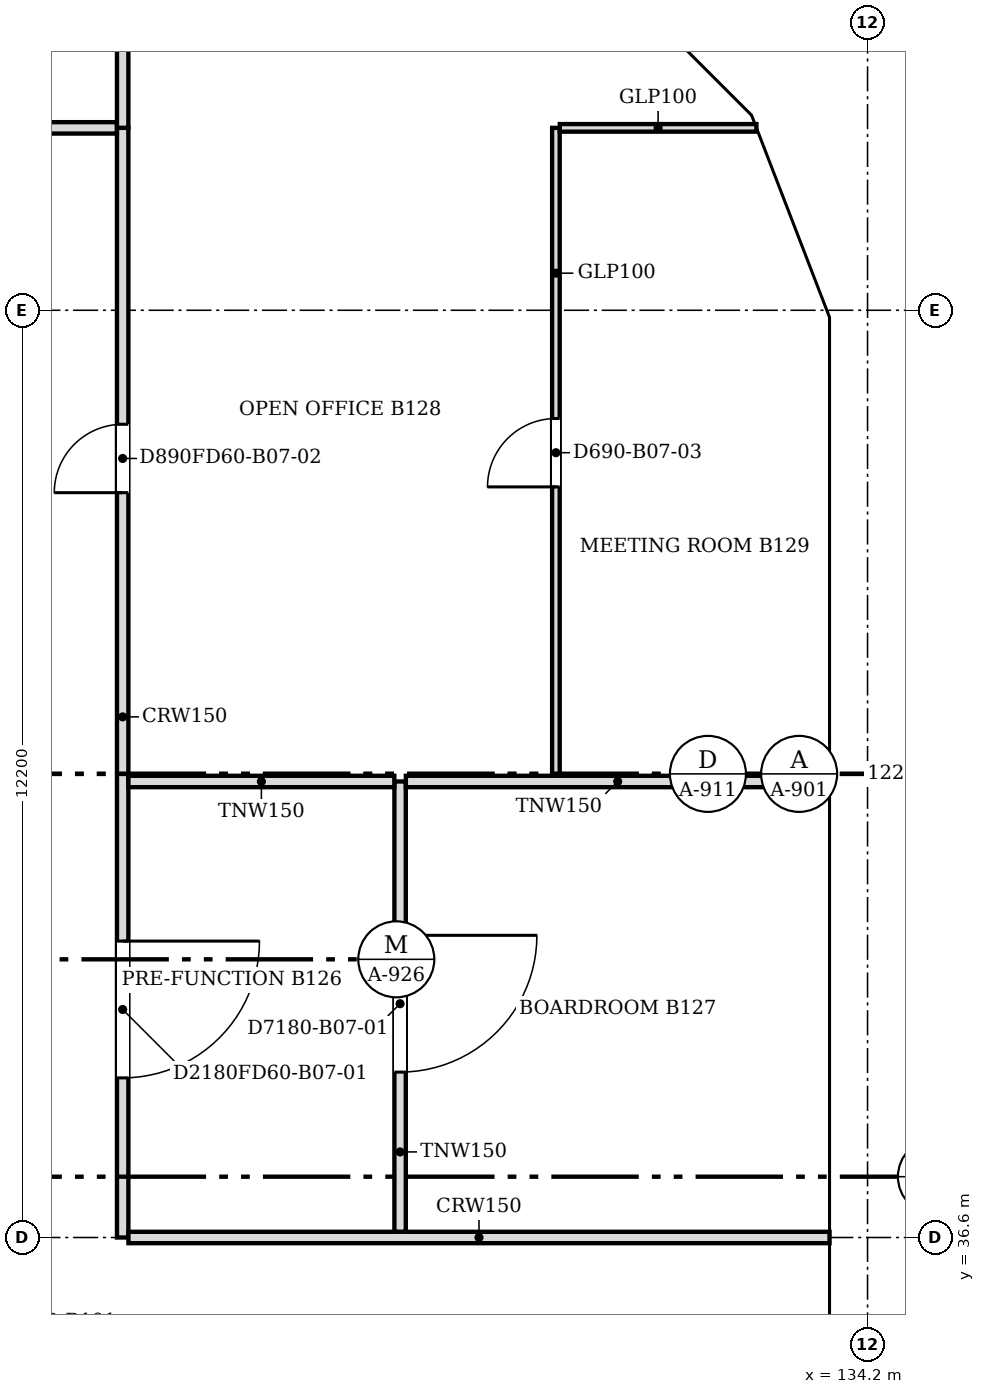
"""IFC4 building model, lengths in metres.
Left out: names, types, materials, properties, quantities, classifications, styles, units other than length and angle.
Written with IfcOpenShell. Run it as: python <this file> out.ifc"""

import sys

from ifc_helpers import new_model, si_unit, direction, frame, frame_2d, origin, place, context, subcontext, project, spatial, polyline, rectangle, outline, extrude, faceted_brep, source, transform, mapped, element, fill, save


model = new_model("IFC4")
c1 = context("Model", 3, precision=1e-05, world=origin(), true_north=direction((0.0, 1.0)))
c2 = subcontext(c1, "Body", "Model", "MODEL_VIEW")
j1 = project(units=[si_unit("LENGTHUNIT", "METRE"), si_unit("PLANEANGLEUNIT", "RADIAN")], contexts=[c1])
p1 = place(None, origin())
s1 = spatial("IfcSite", under=j1, at=p1, CompositionType="ELEMENT")
p2 = place(p1, origin())
s2 = spatial("IfcBuilding", under=s1, at=p2, CompositionType="ELEMENT")
p3 = place(p2, frame((0.0, 0.0, 72.4)))
s3 = spatial("IfcBuildingStorey", under=s2, at=p3, CompositionType="ELEMENT", Elevation=72.4)
m1 = source(origin(), c2, "Body", "Brep", [
    faceted_brep([(3.05, -0.25, 0.0), (6.1, -0.25, 3.8), (6.1, -0.25, 3.8), (3.05, -0.25, 7.6), (0.0, -0.25, 3.8), (0.0, 0.25, 3.8), (3.05, 0.25, 7.6), (6.1, 0.25, 3.8), (6.1, 0.25, 3.8), (3.05, 0.25, 0.0)], [[[0, 1, 2, 3, 4]], [[5, 6, 7, 8, 9]], [[9, 8, 1, 0]], [[7, 6, 3, 2]], [[6, 5, 4, 3]], [[5, 9, 0, 4]], [[1, 8, 7, 2]]]),
])
p4 = place(p3, frame((133.95, 33.55, -3.8), z_axis=(0.0, 0.0, 1.0), x_axis=(0.0, 1.0, 0.0)))
e1 = element("IfcWall", 1, at=p4, inside=s3, PredefinedType="SOLIDWALL", context=c2, shape_type="MappedRepresentation", body=[
    mapped(m1, transform((0.0, 0.0, 0.0), scale=1.0)),
])
m2 = source(origin(), c2, "Body", "SweptSolid", [
    extrude(outline(polyline([(3.05, 0.399), (5.78, 3.8), (3.05, 7.2), (0.321, 3.8), (3.05, 0.399)])), frame((0.0, 0.26, 0.0), z_axis=(0.0, -1.0, 0.0), x_axis=(1.0, 0.0, 0.0)), (0.0, 0.0, 1.0), 0.52),
])
p5 = place(p4, origin())
e2 = element("IfcOpeningElement", 2, at=p5, cuts=e1, PredefinedType="OPENING", context=c2, shape_type="MappedRepresentation", body=[
    mapped(m2, transform((0.0, 0.0, 0.0), scale=1.0)),
])
m3 = source(origin(), c2, "Body", "SweptSolid", [
    extrude(outline(polyline([(3.05, 0.0), (6.1, 3.8), (3.05, 7.6), (0.0, 3.8), (3.05, 0.0)])), frame((0.0, 0.25, 0.0), z_axis=(0.0, -1.0, 0.0), x_axis=(1.0, 0.0, 0.0)), (0.0, 0.0, 1.0), 0.5),
])
p6 = place(p3, frame((133.95, 39.65, -3.8), z_axis=(0.0, 0.0, 1.0), x_axis=(0.0, 1.0, 0.0)))
e3 = element("IfcWall", 3, at=p6, inside=s3, PredefinedType="SOLIDWALL", context=c2, shape_type="MappedRepresentation", body=[
    mapped(m3, transform((0.0, 0.0, 0.0), scale=1.0)),
])
p7 = place(p6, origin())
e4 = element("IfcOpeningElement", 4, at=p7, cuts=e3, PredefinedType="OPENING", context=c2, shape_type="MappedRepresentation", body=[
    mapped(m2, transform((0.0, 0.0, 0.0), scale=1.0)),
])
m4 = source(origin(), c2, "Body", "Brep", [
    faceted_brep([(3.003, -0.25, 0.0), (3.05, -0.25, 0.06), (3.05, -0.25, 7.54), (3.003, -0.25, 7.6), (0.0, -0.25, 3.8), (0.0, 0.25, 3.8), (2.957, 0.25, 7.541), (2.957, 0.25, 0.059), (3.003, 0.0, 0.0), (3.003, 0.0, 7.6)], [[[0, 1, 2, 3, 4]], [[5, 6, 7]], [[1, 0, 8]], [[9, 3, 2]], [[6, 5, 4, 3, 9]], [[5, 7, 8, 0, 4]], [[1, 8, 7, 6, 9, 2]]]),
])
p8 = place(p3, frame((133.95, 45.75, -3.8), z_axis=(0.0, 0.0, 1.0), x_axis=(0.0, 1.0, 0.0)))
e5 = element("IfcWall", 5, at=p8, inside=s3, PredefinedType="SOLIDWALL", context=c2, shape_type="MappedRepresentation", body=[
    mapped(m4, transform((0.0, 0.0, 0.0), scale=1.0)),
])
m5 = source(origin(), c2, "Body", "SweptSolid", [
    extrude(outline(polyline([(2.803, 6.944), (0.319, 3.8), (2.803, 0.656), (2.803, 6.944)])), frame((0.0, 0.26, 0.0), z_axis=(0.0, -1.0, 0.0), x_axis=(1.0, 0.0, 0.0)), (0.0, 0.0, 1.0), 0.52),
])
p9 = place(p8, origin())
e6 = element("IfcOpeningElement", 6, at=p9, cuts=e5, PredefinedType="OPENING", context=c2, shape_type="MappedRepresentation", body=[
    mapped(m5, transform((0.0, 0.0, 0.0), scale=1.0)),
])
m6 = source(origin(), c2, "Body", "Brep", [
    faceted_brep([(0.047, -0.25, 0.0), (2.997, -0.25, 3.8), (0.047, -0.25, 7.6), (0.0, -0.25, 7.541), (0.0, -0.25, 0.059), (0.093, 0.25, 7.54), (2.944, 0.25, 3.868), (2.944, 0.25, 3.732), (0.093, 0.25, 0.06), (2.997, 0.0, 3.8), (0.047, 0.0, 0.0), (0.047, 0.0, 7.6)], [[[0, 1, 2, 3, 4]], [[5, 6, 7, 8]], [[8, 7, 9, 1, 0, 10]], [[6, 5, 11, 2, 1, 9]], [[3, 2, 11]], [[10, 0, 4]], [[8, 10, 4, 3, 11, 5]], [[9, 7, 6]]]),
])
p10 = place(p3, frame((133.967, 48.71, -3.8), z_axis=(0.0, 0.0, 1.0), x_axis=(-0.359901446078, 0.932990326376, 0.0)))
e7 = element("IfcWall", 7, at=p10, inside=s3, PredefinedType="SOLIDWALL", context=c2, shape_type="MappedRepresentation", body=[
    mapped(m6, transform((0.0, 0.0, 0.0), scale=1.0)),
])
m7 = source(origin(), c2, "Body", "SweptSolid", [
    extrude(outline(polyline([(0.247, 0.665), (2.681, 3.8), (0.247, 6.935), (0.247, 0.665)])), frame((0.0, 0.26, 0.0), z_axis=(0.0, -1.0, 0.0), x_axis=(1.0, 0.0, 0.0)), (0.0, 0.0, 1.0), 0.52),
])
p11 = place(p10, origin())
e8 = element("IfcOpeningElement", 8, at=p11, cuts=e7, PredefinedType="OPENING", context=c2, shape_type="MappedRepresentation", body=[
    mapped(m7, transform((0.0, 0.0, 0.0), scale=1.0)),
])
m8 = source(origin(), c2, "Body", "Brep", [
    faceted_brep([(2.944, -0.25, 0.0), (2.997, -0.25, 0.068), (2.997, -0.25, 7.532), (2.944, -0.25, 7.6), (0.0, -0.25, 3.8), (0.053, 0.25, 3.868), (2.891, 0.25, 7.532), (2.891, 0.25, 0.068), (0.053, 0.25, 3.731), (2.944, 0.0, 0.0), (2.944, 0.0, 7.6), (0.0, 0.0, 3.8)], [[[0, 1, 2, 3, 4]], [[5, 6, 7, 8]], [[1, 0, 9]], [[10, 3, 2]], [[6, 5, 11, 4, 3, 10]], [[8, 7, 9, 0, 4, 11]], [[8, 11, 5]], [[1, 9, 7, 6, 10, 2]]]),
])
p12 = place(p3, frame((132.888, 51.506, -3.8), z_axis=(0.0, 0.0, 1.0), x_axis=(-0.707147509625, 0.707066050402, 0.0)))
e9 = element("IfcWall", 9, at=p12, inside=s3, PredefinedType="SOLIDWALL", context=c2, shape_type="MappedRepresentation", body=[
    mapped(m8, transform((0.0, 0.0, 0.0), scale=1.0)),
])
m9 = source(origin(), c2, "Body", "SweptSolid", [
    extrude(outline(polyline([(2.744, 6.934), (0.316, 3.8), (2.744, 0.666), (2.744, 6.934)])), frame((0.0, 0.26, 0.0), z_axis=(0.0, -1.0, 0.0), x_axis=(1.0, 0.0, 0.0)), (0.0, 0.0, 1.0), 0.52),
])
p13 = place(p12, origin())
e10 = element("IfcOpeningElement", 10, at=p13, cuts=e9, PredefinedType="OPENING", context=c2, shape_type="MappedRepresentation", body=[
    mapped(m9, transform((0.0, 0.0, 0.0), scale=1.0)),
])
p14 = place(p2, frame((0.0, 0.0, 76.2)))
s4 = spatial("IfcBuildingStorey", under=s2, at=p14, CompositionType="ELEMENT", Elevation=76.2)
m10 = source(origin(), c2, "Body", "SweptSolid", [
    extrude(outline(polyline([(3.05, 0.0), (6.1, 3.8), (3.05, 7.6), (0.0, 3.8), (3.05, 0.0)])), frame((0.0, 0.25, 0.0), z_axis=(0.0, -1.0, 0.0), x_axis=(1.0, 0.0, 0.0)), (0.0, 0.0, 1.0), 0.5),
])
p15 = place(p14, frame((133.95, 30.5, -3.8), z_axis=(0.0, 0.0, 1.0), x_axis=(0.0, 1.0, 0.0)))
e11 = element("IfcWall", 11, at=p15, inside=s4, PredefinedType="SOLIDWALL", context=c2, shape_type="MappedRepresentation", body=[
    mapped(m10, transform((0.0, 0.0, 0.0), scale=1.0)),
])
m11 = source(origin(), c2, "Body", "SweptSolid", [
    extrude(outline(polyline([(3.05, 0.399), (5.78, 3.8), (3.05, 7.201), (0.321, 3.8), (3.05, 0.399)])), frame((0.0, 0.26, 0.0), z_axis=(0.0, -1.0, 0.0), x_axis=(1.0, 0.0, 0.0)), (0.0, 0.0, 1.0), 0.52),
])
p16 = place(p15, origin())
e12 = element("IfcOpeningElement", 12, at=p16, cuts=e11, PredefinedType="OPENING", context=c2, shape_type="MappedRepresentation", body=[
    mapped(m11, transform((0.0, 0.0, 0.0), scale=1.0)),
])
m12 = source(origin(), c2, "Body", "Brep", [
    faceted_brep([(3.05, -0.25, 0.0), (6.1, -0.25, 3.8), (6.1, -0.25, 3.8), (3.05, -0.25, 7.6), (0.0, -0.25, 3.8), (0.0, 0.25, 3.8), (3.05, 0.25, 7.6), (6.1, 0.25, 3.8), (6.1, 0.25, 3.8), (3.05, 0.25, 0.0)], [[[0, 1, 2, 3, 4]], [[5, 6, 7, 8, 9]], [[9, 8, 1, 0]], [[7, 6, 3, 2]], [[6, 5, 4, 3]], [[5, 9, 0, 4]], [[1, 8, 7, 2]]]),
])
p17 = place(p14, frame((133.95, 36.6, -3.8), z_axis=(0.0, 0.0, 1.0), x_axis=(0.0, 1.0, 0.0)))
e13 = element("IfcWall", 13, at=p17, inside=s4, PredefinedType="SOLIDWALL", context=c2, shape_type="MappedRepresentation", body=[
    mapped(m12, transform((0.0, 0.0, 0.0), scale=1.0)),
])
p18 = place(p17, origin())
e14 = element("IfcOpeningElement", 14, at=p18, cuts=e13, PredefinedType="OPENING", context=c2, shape_type="MappedRepresentation", body=[
    mapped(m11, transform((0.0, 0.0, 0.0), scale=1.0)),
])
m13 = source(origin(), c2, "Body", "Brep", [
    faceted_brep([(3.05, -0.25, 0.0), (6.053, -0.25, 3.8), (3.05, -0.25, 7.6), (0.0, -0.25, 3.8), (0.0, 0.25, 3.8), (3.05, 0.25, 7.6), (6.007, 0.25, 3.859), (6.007, 0.25, 3.741), (3.05, 0.25, 0.0), (6.053, 0.0, 3.8)], [[[0, 1, 2, 3]], [[4, 5, 6, 7, 8]], [[8, 7, 9, 1, 0]], [[6, 5, 2, 1, 9]], [[5, 4, 3, 2]], [[4, 8, 0, 3]], [[9, 7, 6]]]),
])
p19 = place(p14, frame((133.95, 42.7, -3.8), z_axis=(0.0, 0.0, 1.0), x_axis=(0.0, 1.0, 0.0)))
e15 = element("IfcWall", 15, at=p19, inside=s4, PredefinedType="SOLIDWALL", context=c2, shape_type="MappedRepresentation", body=[
    mapped(m13, transform((0.0, 0.0, 0.0), scale=1.0)),
])
m14 = source(origin(), c2, "Body", "SweptSolid", [
    extrude(outline(polyline([(3.049, 0.401), (5.735, 3.8), (3.049, 7.199), (0.321, 3.8), (3.049, 0.401)])), frame((0.0, 0.26, 0.0), z_axis=(0.0, -1.0, 0.0), x_axis=(1.0, 0.0, 0.0)), (0.0, 0.0, 1.0), 0.52),
])
p20 = place(p19, origin())
e16 = element("IfcOpeningElement", 16, at=p20, cuts=e15, PredefinedType="OPENING", context=c2, shape_type="MappedRepresentation", body=[
    mapped(m14, transform((0.0, 0.0, 0.0), scale=1.0)),
])
m15 = source(origin(), c2, "Body", "Brep", [
    faceted_brep([(2.95, -0.25, 0.0), (3.003, -0.25, 0.068), (3.003, -0.25, 7.532), (2.95, -0.25, 7.6), (0.0, -0.25, 3.8), (0.047, 0.25, 3.86), (2.898, 0.25, 7.532), (2.898, 0.25, 0.068), (0.047, 0.25, 3.74), (2.95, 0.0, 0.0), (2.95, 0.0, 7.6), (0.0, 0.0, 3.8)], [[[0, 1, 2, 3, 4]], [[5, 6, 7, 8]], [[1, 0, 9]], [[10, 3, 2]], [[6, 5, 11, 4, 3, 10]], [[8, 7, 9, 0, 4, 11]], [[8, 11, 5]], [[1, 9, 7, 6, 10, 2]]]),
])
p21 = place(p14, frame((133.95, 48.753, -3.8), z_axis=(0.0, 0.0, 1.0), x_axis=(-0.359855894603, 0.933007896601, 0.0)))
e17 = element("IfcWall", 17, at=p21, inside=s4, PredefinedType="SOLIDWALL", context=c2, shape_type="MappedRepresentation", body=[
    mapped(m15, transform((0.0, 0.0, 0.0), scale=1.0)),
])
m16 = source(origin(), c2, "Body", "SweptSolid", [
    extrude(outline(polyline([(2.75, 6.935), (0.316, 3.8), (2.75, 0.665), (2.75, 6.935)])), frame((0.0, 0.26, 0.0), z_axis=(0.0, -1.0, 0.0), x_axis=(1.0, 0.0, 0.0)), (0.0, 0.0, 1.0), 0.52),
])
p22 = place(p21, origin())
e18 = element("IfcOpeningElement", 18, at=p22, cuts=e17, PredefinedType="OPENING", context=c2, shape_type="MappedRepresentation", body=[
    mapped(m16, transform((0.0, 0.0, 0.0), scale=1.0)),
])
m17 = source(origin(), c2, "Body", "Brep", [
    faceted_brep([(0.053, -0.25, 0.0), (2.997, -0.25, 3.8), (0.053, -0.25, 7.6), (0.0, -0.25, 7.532), (0.0, -0.25, 0.068), (0.106, 0.25, 7.532), (2.944, 0.25, 3.868), (2.944, 0.25, 3.732), (0.106, 0.25, 0.068), (2.997, 0.0, 3.8), (0.053, 0.0, 0.0), (0.053, 0.0, 7.6)], [[[0, 1, 2, 3, 4]], [[5, 6, 7, 8]], [[8, 7, 9, 1, 0, 10]], [[6, 5, 11, 2, 1, 9]], [[3, 2, 11]], [[10, 0, 4]], [[8, 10, 4, 3, 11, 5]], [[9, 7, 6]]]),
])
p23 = place(p14, frame((132.926, 51.469, -3.8), z_axis=(0.0, 0.0, 1.0), x_axis=(-0.707066050402, 0.707147509625, 0.0)))
e19 = element("IfcWall", 19, at=p23, inside=s4, PredefinedType="SOLIDWALL", context=c2, shape_type="MappedRepresentation", body=[
    mapped(m17, transform((0.0, 0.0, 0.0), scale=1.0)),
])
m18 = source(origin(), c2, "Body", "SweptSolid", [
    extrude(outline(polyline([(0.253, 0.667), (2.681, 3.8), (0.253, 6.934), (0.253, 0.667)])), frame((0.0, 0.26, 0.0), z_axis=(0.0, -1.0, 0.0), x_axis=(1.0, 0.0, 0.0)), (0.0, 0.0, 1.0), 0.52),
])
p24 = place(p23, origin())
e20 = element("IfcOpeningElement", 20, at=p24, cuts=e19, PredefinedType="OPENING", context=c2, shape_type="MappedRepresentation", body=[
    mapped(m18, transform((0.0, 0.0, 0.0), scale=1.0)),
])
p25 = place(p3, frame((124.4, 51.2, 0.0), z_axis=(0.0, 0.0, 1.0), x_axis=(0.0, -1.0, 0.0)))
e21 = element("IfcWall", 21, at=p25, inside=s3, PredefinedType="PARTITIONING", context=c2, shape_type="SweptSolid", body=[
    extrude(rectangle(XDim=14.6, YDim=0.15, at=frame_2d((7.3, 0.0))), origin(), (0.0, 0.0, 1.0), 3.067),
])
m19 = source(origin(), c2, "Body", "SweptSolid", [
    extrude(rectangle(XDim=0.9, YDim=2.1, at=frame_2d((0.45, 1.05))), frame((0.0, 0.085, 0.0), z_axis=(0.0, -1.0, 0.0), x_axis=(1.0, 0.0, 0.0)), (0.0, 0.0, 1.0), 0.17),
])
p26 = place(p25, frame((3.9, 0.0, 0.0)))
e22 = element("IfcOpeningElement", 22, at=p26, cuts=e21, PredefinedType="OPENING", context=c2, shape_type="MappedRepresentation", body=[
    mapped(m19, transform((0.0, 0.0, 0.0), scale=1.0)),
])
m20 = source(origin(), c2, "Body", "SweptSolid", [
    extrude(rectangle(XDim=1.8, YDim=2.1, at=frame_2d((0.9, 1.05))), frame((0.0, 0.085, 0.0), z_axis=(0.0, -1.0, 0.0), x_axis=(1.0, 0.0, 0.0)), (0.0, 0.0, 1.0), 0.17),
])
p27 = place(p25, frame((10.7, 0.0, 0.0)))
e23 = element("IfcOpeningElement", 23, at=p27, cuts=e21, PredefinedType="OPENING", context=c2, shape_type="MappedRepresentation", body=[
    mapped(m20, transform((0.0, 0.0, 0.0), scale=1.0)),
])
p28 = place(p3, frame((124.476, 36.6, 0.0), z_axis=(0.0, 0.0, 1.0), x_axis=(1.0, 0.0, 0.0)))
e24 = element("IfcWall", 24, at=p28, inside=s3, PredefinedType="PARTITIONING", context=c2, shape_type="SweptSolid", body=[
    extrude(rectangle(XDim=9.224, YDim=0.15, at=frame_2d((4.612, 0.0))), origin(), (0.0, 0.0, 1.0), 3.067),
])
p29 = place(p3, frame((128.05, 42.6, 0.0), z_axis=(0.0, 0.0, 1.0), x_axis=(0.0, -1.0, 0.0)))
e25 = element("IfcWall", 25, at=p29, inside=s3, PredefinedType="PARTITIONING", context=c2, shape_type="SweptSolid", body=[
    extrude(rectangle(XDim=5.924, YDim=0.15, at=frame_2d((2.962, 0.0))), origin(), (0.0, 0.0, 1.0), 3.067),
])
p30 = place(p29, frame((2.024, 0.0, 0.0)))
e26 = element("IfcOpeningElement", 26, at=p30, cuts=e25, PredefinedType="OPENING", context=c2, shape_type="MappedRepresentation", body=[
    mapped(m20, transform((0.0, 0.0, 0.0), scale=1.0)),
])
p31 = place(p3, frame((124.476, 42.6, 0.0), z_axis=(0.0, 0.0, 1.0), x_axis=(1.0, 0.0, 0.0)))
e27 = element("IfcWall", 27, at=p31, inside=s3, PredefinedType="PARTITIONING", context=c2, shape_type="SweptSolid", body=[
    extrude(rectangle(XDim=3.498, YDim=0.15, at=frame_2d((1.749, 0.0))), origin(), (0.0, 0.0, 1.0), 3.067),
])
p32 = place(p3, frame((128.126, 42.6, 0.0), z_axis=(0.0, 0.0, 1.0), x_axis=(1.0, 0.0, 0.0)))
e28 = element("IfcWall", 28, at=p32, inside=s3, PredefinedType="PARTITIONING", context=c2, shape_type="SweptSolid", body=[
    extrude(rectangle(XDim=5.574, YDim=0.15, at=frame_2d((2.787, 0.0))), origin(), (0.0, 0.0, 1.0), 3.067),
])
p33 = place(p3, frame((130.1, 51.2, 0.0), z_axis=(0.0, 0.0, 1.0), x_axis=(0.0, -1.0, 0.0)))
e29 = element("IfcWall", 29, at=p33, inside=s3, PredefinedType="PARTITIONING", context=c2, shape_type="SweptSolid", body=[
    extrude(rectangle(XDim=8.524, YDim=0.1, at=frame_2d((4.262, 0.0))), origin(), (0.0, 0.0, 1.0), 3.067),
])
m21 = source(origin(), c2, "Body", "SweptSolid", [
    extrude(rectangle(XDim=0.9, YDim=2.1, at=frame_2d((0.45, 1.05))), frame((0.0, 0.06, 0.0), z_axis=(0.0, -1.0, 0.0), x_axis=(1.0, 0.0, 0.0)), (0.0, 0.0, 1.0), 0.12),
])
p34 = place(p33, frame((3.824, 0.0, 0.0)))
e30 = element("IfcOpeningElement", 30, at=p34, cuts=e29, PredefinedType="OPENING", context=c2, shape_type="MappedRepresentation", body=[
    mapped(m21, transform((0.0, 0.0, 0.0), scale=1.0)),
])
p35 = place(p3, frame((108.5, 51.2, 0.0), z_axis=(0.0, 0.0, 1.0), x_axis=(1.0, 0.0, 0.0)))
e31 = element("IfcWall", 31, at=p35, inside=s3, PredefinedType="PARTITIONING", context=c2, shape_type="SweptSolid", body=[
    extrude(rectangle(XDim=15.824, YDim=0.15, at=frame_2d((7.912, 0.0))), origin(), (0.0, 0.0, 1.0), 3.067),
])
m22 = source(origin(), c2, "Body", "SweptSolid", [
    extrude(rectangle(XDim=1.0, YDim=2.1, at=frame_2d((0.5, 1.05))), frame((0.0, 0.085, 0.0), z_axis=(0.0, -1.0, 0.0), x_axis=(1.0, 0.0, 0.0)), (0.0, 0.0, 1.0), 0.17),
])
p36 = place(p35, frame((11.451, 0.0, 0.0)))
e32 = element("IfcOpeningElement", 32, at=p36, cuts=e31, PredefinedType="OPENING", context=c2, shape_type="MappedRepresentation", body=[
    mapped(m22, transform((0.0, 0.0, 0.0), scale=1.0)),
])
p37 = place(p35, frame((3.5, 0.0, 0.0)))
e33 = element("IfcOpeningElement", 33, at=p37, cuts=e31, PredefinedType="OPENING", context=c2, shape_type="MappedRepresentation", body=[
    mapped(m22, transform((0.0, 0.0, 0.0), scale=1.0)),
])
p38 = place(p3, frame((124.4, 51.201, 0.0), z_axis=(0.0, 0.0, 1.0), x_axis=(0.0, 1.0, 0.0)))
e34 = element("IfcWall", 34, at=p38, inside=s3, PredefinedType="PARTITIONING", context=c2, shape_type="SweptSolid", body=[
    extrude(rectangle(XDim=3.199, YDim=0.15, at=frame_2d((1.6, 0.0))), origin(), (0.0, 0.0, 1.0), 3.067),
])
p39 = place(p3, frame((130.151, 51.2, 0.0), z_axis=(0.0, 0.0, 1.0), x_axis=(1.0, 0.0, 0.0)))
e35 = element("IfcWall", 35, at=p39, inside=s3, PredefinedType="PARTITIONING", context=c2, shape_type="SweptSolid", body=[
    extrude(rectangle(XDim=2.587, YDim=0.1, at=frame_2d((1.294, 0.0))), origin(), (0.0, 0.0, 1.0), 3.067),
])
m23 = source(origin(), c2, "Body", "SweptSolid", [
    extrude(rectangle(XDim=1.8, YDim=2.1, at=frame_2d((0.9, 1.05))), frame((0.0, 0.025, 0.0), z_axis=(0.0, -1.0, 0.0), x_axis=(1.0, 0.0, 0.0)), (0.0, 0.0, 1.0), 0.05),
])
p40 = place(p30, origin())
e36 = element("IfcDoor", 36, at=p40, inside=s3, OperationType="DOUBLE_DOOR_SINGLE_SWING", PredefinedType="DOOR", context=c2, shape_type="MappedRepresentation", body=[
    mapped(m23, transform((0.0, 0.0, 0.0), scale=1.0)),
])
fill(e26, e36)
m24 = source(origin(), c2, "Body", "SweptSolid", [
    extrude(rectangle(XDim=0.9, YDim=2.1, at=frame_2d((0.45, 1.05))), frame((0.0, 0.025, 0.0), z_axis=(0.0, -1.0, 0.0), x_axis=(1.0, 0.0, 0.0)), (0.0, 0.0, 1.0), 0.05),
])
p41 = place(p26, origin())
e37 = element("IfcDoor", 37, at=p41, inside=s3, OperationType="SINGLE_SWING_RIGHT", PredefinedType="DOOR", context=c2, shape_type="MappedRepresentation", body=[
    mapped(m24, transform((0.0, 0.0, 0.0), scale=1.0)),
])
fill(e22, e37)
p42 = place(p27, origin())
e38 = element("IfcDoor", 38, at=p42, inside=s3, OperationType="DOUBLE_DOOR_SINGLE_SWING", PredefinedType="DOOR", context=c2, shape_type="MappedRepresentation", body=[
    mapped(m23, transform((0.0, 0.0, 0.0), scale=1.0)),
])
fill(e23, e38)
p43 = place(p34, origin())
e39 = element("IfcDoor", 39, at=p43, inside=s3, OperationType="SINGLE_SWING_RIGHT", PredefinedType="DOOR", context=c2, shape_type="MappedRepresentation", body=[
    mapped(m24, transform((0.0, 0.0, 0.0), scale=1.0)),
])
fill(e30, e39)
save(model, sys.argv[1])
